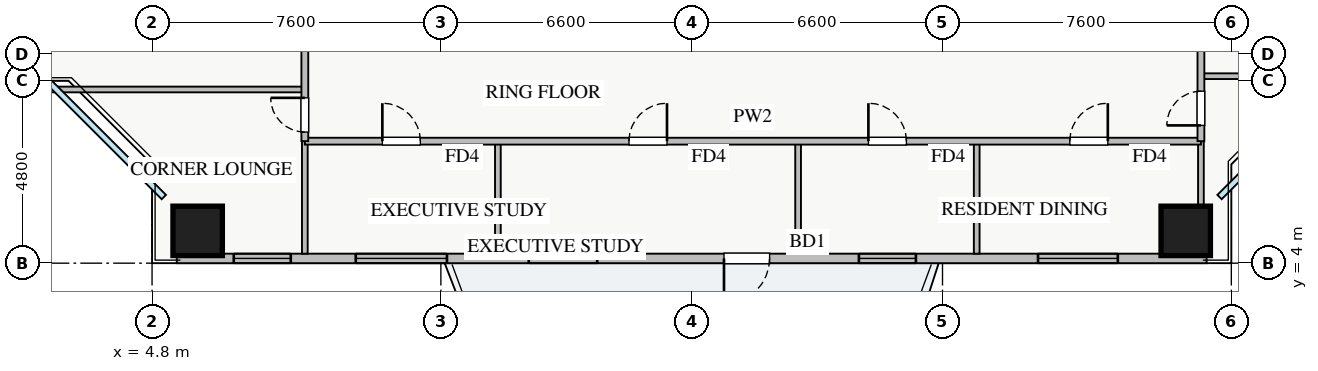
"""IFC4 building model, lengths in metres.
Left out: names, types, materials, properties, quantities, classifications, styles, units other than length and angle.
Written with IfcOpenShell. Run it as: python <this file> out.ifc"""

import sys

from ifc_helpers import new_model, si_unit, direction, frame, frame_2d, origin, origin_2d, place, context, subcontext, project, spatial, rectangle, extrude, source, transform, mapped, element, fill, save


model = new_model("IFC4")
c1 = context("Model", 3, precision=1e-05, world=origin(), true_north=direction((0.0, 1.0)))
c2 = subcontext(c1, "Body", "Model", "MODEL_VIEW")
j1 = project(units=[si_unit("LENGTHUNIT", "METRE"), si_unit("PLANEANGLEUNIT", "RADIAN")], contexts=[c1])
p1 = place(None, origin())
s1 = spatial("IfcSite", under=j1, at=p1, CompositionType="ELEMENT")
p2 = place(p1, origin())
s2 = spatial("IfcBuilding", under=s1, at=p2, CompositionType="ELEMENT")
p3 = place(p2, frame((0.0, 0.0, 50.25)))
s3 = spatial("IfcBuildingStorey", under=s2, at=p3, CompositionType="ELEMENT", Elevation=50.25)
m1 = source(origin(), c2, "Body", "SweptSolid", [
    extrude(rectangle(XDim=1.3, YDim=1.3, at=origin_2d()), origin(), (0.0, 0.0, 1.0), 3.25),
])
for number, where, z_axis, x_axis in (
    (1, (6.0, 4.85, 0.0), (0.0, 0.0, 1.0), (1.0, 0.0, 0.0)),
    (2, (32.0, 4.85, 0.0), (0.0, 0.0, 1.0), (1.0, 0.0, 0.0)),
):
    element("IfcColumn", number, at=place(p3, frame(where, z_axis=z_axis, x_axis=x_axis)), inside=s3, PredefinedType="COLUMN", context=c2, shape_type="MappedRepresentation", body=[
        mapped(m1, transform((0.0, 0.0, 0.0), x_axis=(1.0, 0.0, 0.0), y_axis=(0.0, 1.0, 0.0), z_axis=(0.0, 0.0, 1.0), scale=1.0)),
    ])
p4 = place(p3, frame((5.45, 4.125, 0.0), z_axis=(0.0, 0.0, 1.0), x_axis=(1.0, 0.0, 0.0)))
e3 = element("IfcWall", 3, at=p4, inside=s3, PredefinedType="STANDARD", context=c2, shape_type="SweptSolid", body=[
    extrude(rectangle(XDim=27.1, YDim=0.25, at=frame_2d((13.55, 0.0))), origin(), (0.0, 0.0, 1.0), 2.61),
])
p5 = place(p4, frame((14.4, 0.0, 0.0)))
e4 = element("IfcOpeningElement", 4, at=p5, cuts=e3, PredefinedType="OPENING", context=c2, shape_type="SweptSolid", body=[
    extrude(rectangle(XDim=1.2, YDim=2.1, at=frame_2d((0.6, 1.05))), frame((0.0, 0.135, 0.0), z_axis=(0.0, -1.0, 0.0), x_axis=(1.0, 0.0, 0.0)), (0.0, 0.0, 1.0), 0.27),
])
p6 = place(p4, frame((1.5, 0.0, 0.9)))
e5 = element("IfcOpeningElement", 5, at=p6, cuts=e3, PredefinedType="OPENING", context=c2, shape_type="SweptSolid", body=[
    extrude(rectangle(XDim=1.5, YDim=1.5, at=frame_2d((0.75, 0.75))), frame((0.0, 0.135, 0.0), z_axis=(0.0, -1.0, 0.0), x_axis=(1.0, 0.0, 0.0)), (0.0, 0.0, 1.0), 0.27),
])
p7 = place(p4, frame((9.263, 0.0, 0.9)))
e6 = element("IfcOpeningElement", 6, at=p7, cuts=e3, PredefinedType="OPENING", context=c2, shape_type="SweptSolid", body=[
    extrude(rectangle(XDim=1.8, YDim=1.45, at=frame_2d((0.9, 0.725))), frame((0.0, 0.135, 0.0), z_axis=(0.0, -1.0, 0.0), x_axis=(1.0, 0.0, 0.0)), (0.0, 0.0, 1.0), 0.27),
])
p8 = place(p4, frame((17.95, 0.0, 0.9)))
e7 = element("IfcOpeningElement", 7, at=p8, cuts=e3, PredefinedType="OPENING", context=c2, shape_type="SweptSolid", body=[
    extrude(rectangle(XDim=1.5, YDim=1.5, at=frame_2d((0.75, 0.75))), frame((0.0, 0.135, 0.0), z_axis=(0.0, -1.0, 0.0), x_axis=(1.0, 0.0, 0.0)), (0.0, 0.0, 1.0), 0.27),
])
p9 = place(p4, frame((22.663, 0.0, 0.9)))
e8 = element("IfcOpeningElement", 8, at=p9, cuts=e3, PredefinedType="OPENING", context=c2, shape_type="SweptSolid", body=[
    extrude(rectangle(XDim=2.1, YDim=1.48, at=frame_2d((1.05, 0.74))), frame((0.0, 0.135, 0.0), z_axis=(0.0, -1.0, 0.0), x_axis=(1.0, 0.0, 0.0)), (0.0, 0.0, 1.0), 0.27),
])
p10 = place(p4, frame((4.71, 0.0, 0.9)))
e9 = element("IfcOpeningElement", 9, at=p10, cuts=e3, PredefinedType="OPENING", context=c2, shape_type="SweptSolid", body=[
    extrude(rectangle(XDim=2.4, YDim=1.5, at=frame_2d((1.2, 0.75))), frame((0.0, 0.135, 0.0), z_axis=(0.0, -1.0, 0.0), x_axis=(1.0, 0.0, 0.0)), (0.0, 0.0, 1.0), 0.27),
])
for number, where, z_axis, x_axis in (
    (10, (13.9, 4.25, 0.0), (0.0, 0.0, 1.0), (0.0, 1.0, 0.0)),
    (11, (21.8, 4.25, 0.0), (0.0, 0.0, 1.0), (0.0, 1.0, 0.0)),
    (12, (26.5, 4.25, 0.0), (0.0, 0.0, 1.0), (0.0, 1.0, 0.0)),
    (13, (8.82, 4.25, 0.0), (0.0, 0.0, 1.0), (0.0, 1.0, 0.0)),
    (14, (32.4, 4.25, 0.0), (0.0, 0.0, 1.0), (0.0, 1.0, 0.0)),
):
    element("IfcWall", number, at=place(p3, frame(where, z_axis=z_axis, x_axis=x_axis)), inside=s3, PredefinedType="PARTITIONING", context=c2, shape_type="SweptSolid", body=[
        extrude(rectangle(XDim=2.96, YDim=0.15, at=frame_2d((1.48, 0.0))), origin(), (0.0, 0.0, 1.0), 3.07),
    ])
p11 = place(p3, frame((8.82, 7.21, 0.0), z_axis=(0.0, 0.0, 1.0), x_axis=(1.0, 0.0, 0.0)))
e15 = element("IfcWall", 15, at=p11, inside=s3, PredefinedType="PARTITIONING", context=c2, shape_type="SweptSolid", body=[
    extrude(rectangle(XDim=23.58, YDim=0.18, at=frame_2d((11.79, 0.0))), origin(), (0.0, 0.0, 1.0), 3.07),
])
p12 = place(p11, frame((2.04, 0.0, 0.0)))
e16 = element("IfcOpeningElement", 16, at=p12, cuts=e15, PredefinedType="OPENING", context=c2, shape_type="SweptSolid", body=[
    extrude(rectangle(XDim=1.0, YDim=2.05, at=frame_2d((0.5, 1.025))), frame((0.0, 0.1, 0.0), z_axis=(0.0, -1.0, 0.0), x_axis=(1.0, 0.0, 0.0)), (0.0, 0.0, 1.0), 0.2),
])
p13 = place(p11, frame((8.53, 0.0, 0.0)))
e17 = element("IfcOpeningElement", 17, at=p13, cuts=e15, PredefinedType="OPENING", context=c2, shape_type="SweptSolid", body=[
    extrude(rectangle(XDim=1.0, YDim=2.05, at=frame_2d((0.5, 1.025))), frame((0.0, 0.1, 0.0), z_axis=(0.0, -1.0, 0.0), x_axis=(1.0, 0.0, 0.0)), (0.0, 0.0, 1.0), 0.2),
])
p14 = place(p11, frame((14.83, 0.0, 0.0)))
e18 = element("IfcOpeningElement", 18, at=p14, cuts=e15, PredefinedType="OPENING", context=c2, shape_type="SweptSolid", body=[
    extrude(rectangle(XDim=1.0, YDim=2.05, at=frame_2d((0.5, 1.025))), frame((0.0, 0.1, 0.0), z_axis=(0.0, -1.0, 0.0), x_axis=(1.0, 0.0, 0.0)), (0.0, 0.0, 1.0), 0.2),
])
p15 = place(p11, frame((20.13, 0.0, 0.0)))
e19 = element("IfcOpeningElement", 19, at=p15, cuts=e15, PredefinedType="OPENING", context=c2, shape_type="SweptSolid", body=[
    extrude(rectangle(XDim=1.0, YDim=2.05, at=frame_2d((0.5, 1.025))), frame((0.0, 0.1, 0.0), z_axis=(0.0, -1.0, 0.0), x_axis=(1.0, 0.0, 0.0)), (0.0, 0.0, 1.0), 0.2),
])
p16 = place(p3, frame((0.25, 8.57, 0.0), z_axis=(0.0, 0.0, 1.0), x_axis=(1.0, 0.0, 0.0)))
e20 = element("IfcWall", 20, at=p16, inside=s3, PredefinedType="PARTITIONING", context=c2, shape_type="SweptSolid", body=[
    extrude(rectangle(XDim=8.57, YDim=0.15, at=frame_2d((4.285, 0.0))), origin(), (0.0, 0.0, 1.0), 3.07),
])
p17 = place(p3, frame((8.82, 7.21, 0.0), z_axis=(0.0, 0.0, 1.0), x_axis=(0.0, 1.0, 0.0)))
e21 = element("IfcWall", 21, at=p17, inside=s3, PredefinedType="PARTITIONING", context=c2, shape_type="SweptSolid", body=[
    extrude(rectangle(XDim=31.23, YDim=0.18, at=frame_2d((15.615, 0.0))), origin(), (0.0, 0.0, 1.0), 3.07),
])
p18 = place(p17, frame((30.09, 0.0, 0.0)))
e22 = element("IfcOpeningElement", 22, at=p18, cuts=e21, PredefinedType="OPENING", context=c2, shape_type="SweptSolid", body=[
    extrude(rectangle(XDim=0.9, YDim=2.05, at=frame_2d((0.45, 1.025))), frame((0.0, 0.1, 0.0), z_axis=(0.0, -1.0, 0.0), x_axis=(1.0, 0.0, 0.0)), (0.0, 0.0, 1.0), 0.2),
])
p19 = place(p17, frame((0.24, 0.0, 0.0)))
e23 = element("IfcOpeningElement", 23, at=p19, cuts=e21, PredefinedType="OPENING", context=c2, shape_type="SweptSolid", body=[
    extrude(rectangle(XDim=0.9, YDim=2.05, at=frame_2d((0.45, 1.025))), frame((0.0, 0.1, 0.0), z_axis=(0.0, -1.0, 0.0), x_axis=(1.0, 0.0, 0.0)), (0.0, 0.0, 1.0), 0.2),
])
p20 = place(p17, frame((2.95, 0.0, 0.0)))
e24 = element("IfcOpeningElement", 24, at=p20, cuts=e21, PredefinedType="OPENING", context=c2, shape_type="SweptSolid", body=[
    extrude(rectangle(XDim=1.0, YDim=2.05, at=frame_2d((0.5, 1.025))), frame((0.0, 0.1, 0.0), z_axis=(0.0, -1.0, 0.0), x_axis=(1.0, 0.0, 0.0)), (0.0, 0.0, 1.0), 0.2),
])
p21 = place(p17, frame((15.115, 0.0, 0.0)))
e25 = element("IfcOpeningElement", 25, at=p21, cuts=e21, PredefinedType="OPENING", context=c2, shape_type="SweptSolid", body=[
    extrude(rectangle(XDim=1.0, YDim=2.05, at=frame_2d((0.5, 1.025))), frame((0.0, 0.1, 0.0), z_axis=(0.0, -1.0, 0.0), x_axis=(1.0, 0.0, 0.0)), (0.0, 0.0, 1.0), 0.2),
])
p22 = place(p17, frame((21.96, 0.0, 0.0)))
e26 = element("IfcOpeningElement", 26, at=p22, cuts=e21, PredefinedType="OPENING", context=c2, shape_type="SweptSolid", body=[
    extrude(rectangle(XDim=1.0, YDim=2.05, at=frame_2d((0.5, 1.025))), frame((0.0, 0.1, 0.0), z_axis=(0.0, -1.0, 0.0), x_axis=(1.0, 0.0, 0.0)), (0.0, 0.0, 1.0), 0.2),
])
p23 = place(p3, frame((32.4, 8.92, 0.0), z_axis=(0.0, 0.0, 1.0), x_axis=(1.0, 0.0, 0.0)))
e27 = element("IfcWall", 27, at=p23, inside=s3, PredefinedType="PARTITIONING", context=c2, shape_type="SweptSolid", body=[
    extrude(rectangle(XDim=5.35, YDim=0.15, at=frame_2d((2.675, 0.0))), origin(), (0.0, 0.0, 1.0), 3.07),
])
p24 = place(p3, frame((32.4, 7.21, 0.0), z_axis=(0.0, 0.0, 1.0), x_axis=(0.0, 1.0, 0.0)))
e28 = element("IfcWall", 28, at=p24, inside=s3, PredefinedType="PARTITIONING", context=c2, shape_type="SweptSolid", body=[
    extrude(rectangle(XDim=31.23, YDim=0.18, at=frame_2d((15.615, 0.0))), origin(), (0.0, 0.0, 1.0), 2.765),
])
p25 = place(p24, frame((30.09, 0.0, 0.0)))
e29 = element("IfcOpeningElement", 29, at=p25, cuts=e28, PredefinedType="OPENING", context=c2, shape_type="SweptSolid", body=[
    extrude(rectangle(XDim=0.9, YDim=2.05, at=frame_2d((0.45, 1.025))), frame((0.0, 0.1, 0.0), z_axis=(0.0, -1.0, 0.0), x_axis=(1.0, 0.0, 0.0)), (0.0, 0.0, 1.0), 0.2),
])
p26 = place(p24, frame((0.415, 0.0, 0.0)))
e30 = element("IfcOpeningElement", 30, at=p26, cuts=e28, PredefinedType="OPENING", context=c2, shape_type="SweptSolid", body=[
    extrude(rectangle(XDim=0.9, YDim=2.05, at=frame_2d((0.45, 1.025))), frame((0.0, 0.1, 0.0), z_axis=(0.0, -1.0, 0.0), x_axis=(1.0, 0.0, 0.0)), (0.0, 0.0, 1.0), 0.2),
])
p27 = place(p24, frame((3.585, 0.0, 0.0)))
e31 = element("IfcOpeningElement", 31, at=p27, cuts=e28, PredefinedType="OPENING", context=c2, shape_type="SweptSolid", body=[
    extrude(rectangle(XDim=1.0, YDim=2.05, at=frame_2d((0.5, 1.025))), frame((0.0, 0.1, 0.0), z_axis=(0.0, -1.0, 0.0), x_axis=(1.0, 0.0, 0.0)), (0.0, 0.0, 1.0), 0.2),
])
p28 = place(p24, frame((12.86, 0.0, 0.0)))
e32 = element("IfcOpeningElement", 32, at=p28, cuts=e28, PredefinedType="OPENING", context=c2, shape_type="SweptSolid", body=[
    extrude(rectangle(XDim=1.0, YDim=2.05, at=frame_2d((0.5, 1.025))), frame((0.0, 0.1, 0.0), z_axis=(0.0, -1.0, 0.0), x_axis=(1.0, 0.0, 0.0)), (0.0, 0.0, 1.0), 0.2),
])
p29 = place(p24, frame((22.5, 0.0, 0.0)))
e33 = element("IfcOpeningElement", 33, at=p29, cuts=e28, PredefinedType="OPENING", context=c2, shape_type="SweptSolid", body=[
    extrude(rectangle(XDim=1.0, YDim=2.05, at=frame_2d((0.5, 1.025))), frame((0.0, 0.1, 0.0), z_axis=(0.0, -1.0, 0.0), x_axis=(1.0, 0.0, 0.0)), (0.0, 0.0, 1.0), 0.2),
])
m2 = source(origin(), c2, "Body", "SweptSolid", [
    extrude(rectangle(XDim=1.2, YDim=2.1, at=frame_2d((0.6, 1.05))), frame((0.0, 0.025, 0.0), z_axis=(0.0, -1.0, 0.0), x_axis=(1.0, 0.0, 0.0)), (0.0, 0.0, 1.0), 0.05),
])
p30 = place(p5, frame((1.2, 0.0, 0.0), z_axis=(0.0, 0.0, 1.0), x_axis=(-1.0, 0.0, 0.0)))
e34 = element("IfcDoor", 34, at=p30, inside=s3, OperationType="SINGLE_SWING_LEFT", PredefinedType="DOOR", context=c2, shape_type="MappedRepresentation", body=[
    mapped(m2, transform((0.0, 0.0, 0.0), x_axis=(1.0, 0.0, 0.0), y_axis=(0.0, 1.0, 0.0), z_axis=(0.0, 0.0, 1.0), scale=1.0)),
])
fill(e4, e34)
m3 = source(origin(), c2, "Body", "SweptSolid", [
    extrude(rectangle(XDim=1.5, YDim=1.5, at=frame_2d((0.75, 0.75))), frame((0.0, 0.03, 0.0), z_axis=(0.0, -1.0, 0.0), x_axis=(1.0, 0.0, 0.0)), (0.0, 0.0, 1.0), 0.06),
])
p31 = place(p6, origin())
e35 = element("IfcWindow", 35, at=p31, inside=s3, PartitioningType="TRIPLE_PANEL_VERTICAL", PredefinedType="WINDOW", context=c2, shape_type="MappedRepresentation", body=[
    mapped(m3, transform((0.0, 0.0, 0.0), x_axis=(1.0, 0.0, 0.0), y_axis=(0.0, 1.0, 0.0), z_axis=(0.0, 0.0, 1.0), scale=1.0)),
])
fill(e5, e35)
m4 = source(origin(), c2, "Body", "SweptSolid", [
    extrude(rectangle(XDim=1.8, YDim=1.45, at=frame_2d((0.9, 0.725))), frame((0.0, 0.03, 0.0), z_axis=(0.0, -1.0, 0.0), x_axis=(1.0, 0.0, 0.0)), (0.0, 0.0, 1.0), 0.06),
])
p32 = place(p7, origin())
e36 = element("IfcWindow", 36, at=p32, inside=s3, PartitioningType="DOUBLE_PANEL_VERTICAL", PredefinedType="WINDOW", context=c2, shape_type="MappedRepresentation", body=[
    mapped(m4, transform((0.0, 0.0, 0.0), x_axis=(1.0, 0.0, 0.0), y_axis=(0.0, 1.0, 0.0), z_axis=(0.0, 0.0, 1.0), scale=1.0)),
])
fill(e6, e36)
p33 = place(p8, origin())
e37 = element("IfcWindow", 37, at=p33, inside=s3, PartitioningType="DOUBLE_PANEL_VERTICAL", PredefinedType="WINDOW", context=c2, shape_type="MappedRepresentation", body=[
    mapped(m3, transform((0.0, 0.0, 0.0), x_axis=(1.0, 0.0, 0.0), y_axis=(0.0, 1.0, 0.0), z_axis=(0.0, 0.0, 1.0), scale=1.0)),
])
fill(e7, e37)
m5 = source(origin(), c2, "Body", "SweptSolid", [
    extrude(rectangle(XDim=2.1, YDim=1.48, at=frame_2d((1.05, 0.74))), frame((0.0, 0.03, 0.0), z_axis=(0.0, -1.0, 0.0), x_axis=(1.0, 0.0, 0.0)), (0.0, 0.0, 1.0), 0.06),
])
p34 = place(p9, origin())
e38 = element("IfcWindow", 38, at=p34, inside=s3, PartitioningType="TRIPLE_PANEL_VERTICAL", PredefinedType="WINDOW", context=c2, shape_type="MappedRepresentation", body=[
    mapped(m5, transform((0.0, 0.0, 0.0), x_axis=(1.0, 0.0, 0.0), y_axis=(0.0, 1.0, 0.0), z_axis=(0.0, 0.0, 1.0), scale=1.0)),
])
fill(e8, e38)
m6 = source(origin(), c2, "Body", "SweptSolid", [
    extrude(rectangle(XDim=1.0, YDim=2.05, at=frame_2d((0.5, 1.025))), frame((0.0, 0.025, 0.0), z_axis=(0.0, -1.0, 0.0), x_axis=(1.0, 0.0, 0.0)), (0.0, 0.0, 1.0), 0.05),
])
p35 = place(p12, origin())
e39 = element("IfcDoor", 39, at=p35, inside=s3, OperationType="SINGLE_SWING_LEFT", PredefinedType="DOOR", context=c2, shape_type="MappedRepresentation", body=[
    mapped(m6, transform((0.0, 0.0, 0.0), x_axis=(1.0, 0.0, 0.0), y_axis=(0.0, 1.0, 0.0), z_axis=(0.0, 0.0, 1.0), scale=1.0)),
])
fill(e16, e39)
p36 = place(p13, origin())
e40 = element("IfcDoor", 40, at=p36, inside=s3, OperationType="SINGLE_SWING_RIGHT", PredefinedType="DOOR", context=c2, shape_type="MappedRepresentation", body=[
    mapped(m6, transform((0.0, 0.0, 0.0), x_axis=(1.0, 0.0, 0.0), y_axis=(0.0, 1.0, 0.0), z_axis=(0.0, 0.0, 1.0), scale=1.0)),
])
fill(e17, e40)
p37 = place(p14, origin())
e41 = element("IfcDoor", 41, at=p37, inside=s3, OperationType="SINGLE_SWING_LEFT", PredefinedType="DOOR", context=c2, shape_type="MappedRepresentation", body=[
    mapped(m6, transform((0.0, 0.0, 0.0), x_axis=(1.0, 0.0, 0.0), y_axis=(0.0, 1.0, 0.0), z_axis=(0.0, 0.0, 1.0), scale=1.0)),
])
fill(e18, e41)
p38 = place(p15, origin())
e42 = element("IfcDoor", 42, at=p38, inside=s3, OperationType="SINGLE_SWING_RIGHT", PredefinedType="DOOR", context=c2, shape_type="MappedRepresentation", body=[
    mapped(m6, transform((0.0, 0.0, 0.0), x_axis=(1.0, 0.0, 0.0), y_axis=(0.0, 1.0, 0.0), z_axis=(0.0, 0.0, 1.0), scale=1.0)),
])
fill(e19, e42)
m7 = source(origin(), c2, "Body", "SweptSolid", [
    extrude(rectangle(XDim=0.9, YDim=2.05, at=frame_2d((0.45, 1.025))), frame((0.0, 0.025, 0.0), z_axis=(0.0, -1.0, 0.0), x_axis=(1.0, 0.0, 0.0)), (0.0, 0.0, 1.0), 0.05),
])
p39 = place(p19, origin())
e43 = element("IfcDoor", 43, at=p39, inside=s3, OperationType="SINGLE_SWING_RIGHT", PredefinedType="DOOR", context=c2, shape_type="MappedRepresentation", body=[
    mapped(m7, transform((0.0, 0.0, 0.0), x_axis=(1.0, 0.0, 0.0), y_axis=(0.0, 1.0, 0.0), z_axis=(0.0, 0.0, 1.0), scale=1.0)),
])
fill(e23, e43)
p40 = place(p26, origin())
e44 = element("IfcDoor", 44, at=p40, inside=s3, OperationType="SINGLE_SWING_LEFT", PredefinedType="DOOR", context=c2, shape_type="MappedRepresentation", body=[
    mapped(m7, transform((0.0, 0.0, 0.0), x_axis=(1.0, 0.0, 0.0), y_axis=(0.0, 1.0, 0.0), z_axis=(0.0, 0.0, 1.0), scale=1.0)),
])
fill(e30, e44)
m8 = source(origin(), c2, "Body", "SweptSolid", [
    extrude(rectangle(XDim=2.4, YDim=1.5, at=frame_2d((1.2, 0.75))), frame((0.0, 0.03, 0.0), z_axis=(0.0, -1.0, 0.0), x_axis=(1.0, 0.0, 0.0)), (0.0, 0.0, 1.0), 0.06),
])
p41 = place(p10, origin())
e45 = element("IfcWindow", 45, at=p41, inside=s3, PartitioningType="TRIPLE_PANEL_VERTICAL", PredefinedType="WINDOW", context=c2, shape_type="MappedRepresentation", body=[
    mapped(m8, transform((0.0, 0.0, 0.0), x_axis=(1.0, 0.0, 0.0), y_axis=(0.0, 1.0, 0.0), z_axis=(0.0, 0.0, 1.0), scale=1.0)),
])
fill(e9, e45)
save(model, sys.argv[1])
